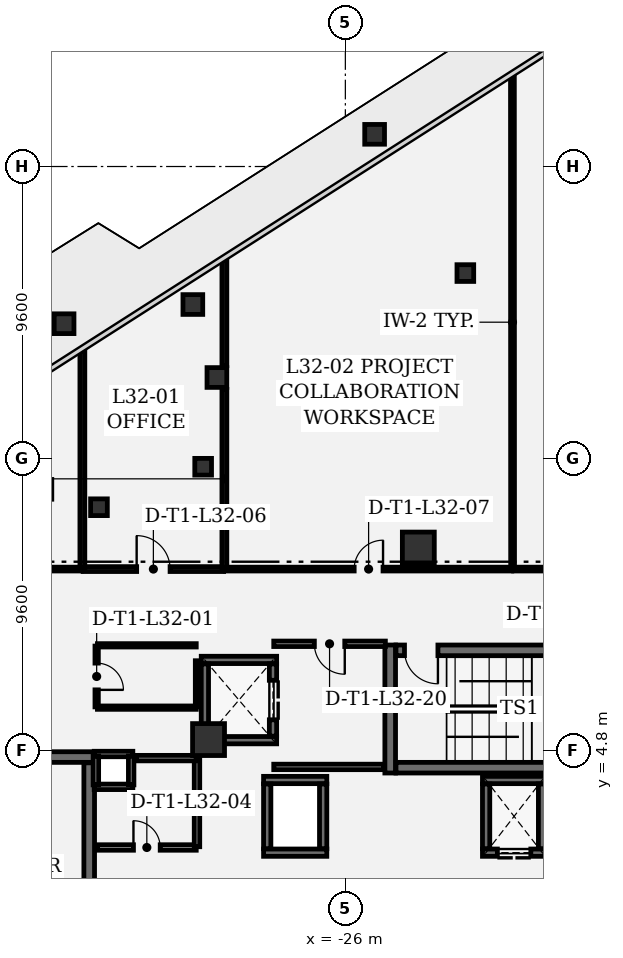
"""IFC4 building model, lengths in metres.
Left out: names, types, materials, properties, quantities, classifications, styles, units other than length and angle.
Written with IfcOpenShell. Run it as: python <this file> out.ifc"""

import sys

from ifc_helpers import new_model, si_unit, direction, frame, frame_2d, origin, origin_2d, place, context, subcontext, project, spatial, rectangle, extrude, element, fill, save


model = new_model("IFC4")
c1 = context("Model", 3, precision=1e-05, world=origin(), true_north=direction((0.0, 1.0)))
c2 = subcontext(c1, "Body", "Model", "MODEL_VIEW")
j1 = project(units=[si_unit("LENGTHUNIT", "METRE"), si_unit("PLANEANGLEUNIT", "RADIAN")], contexts=[c1])
p1 = place(None, origin())
s1 = spatial("IfcSite", under=j1, at=p1, CompositionType="ELEMENT")
p2 = place(p1, origin())
s2 = spatial("IfcBuilding", under=s1, at=p2, CompositionType="ELEMENT")
p3 = place(p2, frame((0.0, 0.0, 142.2)))
s3 = spatial("IfcBuildingStorey", under=s2, at=p3, CompositionType="ELEMENT", Elevation=142.2)
for number, where, z_axis, x_axis in (
    (1, (-23.6, 11.45, 0.0), (0.0, 0.0, 1.0), (1.0, 0.0, 0.0)),
    (2, (-30.5, 5.15, 0.0), (0.0, 0.0, 1.0), (1.0, 0.0, 0.0)),
):
    element("IfcColumn", number, at=place(p3, frame(where, z_axis=z_axis, x_axis=x_axis)), inside=s3, PredefinedType="COLUMN", context=c2, shape_type="SweptSolid", body=[
        extrude(rectangle(XDim=1.05, YDim=1.05, at=origin_2d()), origin(), (0.0, 0.0, 1.0), 4.05),
    ])
for number, where, z_axis, x_axis in (
    (3, (-35.252, 18.829, 0.0), (0.0, 0.0, 1.0), (1.0, 0.0, 0.0)),
    (4, (-25.038, 25.059, 0.0), (0.0, 0.0, 1.0), (1.0, 0.0, 0.0)),
    (5, (-31.016, 19.46, 0.0), (0.0, 0.0, 1.0), (1.0, 0.0, 0.0)),
    (6, (-30.225, 17.06, 0.0), (0.0, 0.0, 1.0), (1.0, 0.0, 0.0)),
):
    element("IfcColumn", number, at=place(p3, frame(where, z_axis=z_axis, x_axis=x_axis)), inside=s3, PredefinedType="COLUMN", context=c2, shape_type="SweptSolid", body=[
        extrude(rectangle(XDim=0.65, YDim=0.65, at=origin_2d()), origin(), (0.0, 0.0, 1.0), 4.05),
    ])
for number, where, z_axis, x_axis in (
    (7, (-34.104, 12.792, 0.0), (0.0, 0.0, 1.0), (1.0, 0.0, 0.0)),
    (8, (-22.053, 20.495, 0.0), (0.0, 0.0, 1.0), (1.0, 0.0, 0.0)),
    (9, (-30.677, 14.124, 0.0), (0.0, 0.0, 1.0), (1.0, 0.0, 0.0)),
):
    element("IfcColumn", number, at=place(p3, frame(where, z_axis=z_axis, x_axis=x_axis)), inside=s3, PredefinedType="COLUMN", context=c2, shape_type="SweptSolid", body=[
        extrude(rectangle(XDim=0.55, YDim=0.55, at=origin_2d()), origin(), (0.0, 0.0, 1.0), 4.05),
    ])
p4 = place(p3, frame((-24.525, 8.26, 0.0), z_axis=(0.0, 0.0, 1.0), x_axis=(0.0, -1.0, 0.0)))
e10 = element("IfcWall", 10, at=p4, inside=s3, PredefinedType="SHEAR", context=c2, shape_type="SweptSolid", body=[
    extrude(rectangle(XDim=4.21, YDim=0.35, at=frame_2d((2.105, 0.0))), origin(), (0.0, 0.0, 1.0), 3.78),
])
p5 = place(p3, frame((-24.335, 4.225, 0.0), z_axis=(0.0, 0.0, 1.0), x_axis=(1.0, 0.0, 0.0)))
e11 = element("IfcWall", 11, at=p5, inside=s3, PredefinedType="SHEAR", context=c2, shape_type="SweptSolid", body=[
    extrude(rectangle(XDim=8.12, YDim=0.35, at=frame_2d((4.06, 0.0))), origin(), (0.0, 0.0, 1.0), 3.78),
])
p6 = place(p3, frame((-16.215, 8.085, 0.0), z_axis=(0.0, 0.0, 1.0), x_axis=(-1.0, 0.0, 0.0)))
e12 = element("IfcWall", 12, at=p6, inside=s3, PredefinedType="SHEAR", context=c2, shape_type="SweptSolid", body=[
    extrude(rectangle(XDim=8.12, YDim=0.35, at=frame_2d((4.06, 0.0))), origin(), (0.0, 0.0, 1.0), 3.78),
])
p7 = place(p6, frame((6.74, 0.0, 0.0)))
e13 = element("IfcOpeningElement", 13, at=p7, cuts=e12, PredefinedType="OPENING", context=c2, shape_type="SweptSolid", body=[
    extrude(rectangle(XDim=1.1, YDim=2.2, at=frame_2d((0.55, 1.1))), frame((0.0, 0.185, 0.0), z_axis=(0.0, -1.0, 0.0), x_axis=(1.0, 0.0, 0.0)), (0.0, 0.0, 1.0), 0.37),
])
p8 = place(p3, frame((-34.25, 4.575, 0.0), z_axis=(0.0, 0.0, 1.0), x_axis=(-1.0, 0.0, 0.0)))
e14 = element("IfcWall", 14, at=p8, inside=s3, PredefinedType="SHEAR", context=c2, shape_type="SweptSolid", body=[
    extrude(rectangle(XDim=4.21, YDim=0.35, at=frame_2d((2.105, 0.0))), origin(), (0.0, 0.0, 1.0), 3.78),
])
p9 = place(p3, frame((-34.425, -4.385, 0.0), z_axis=(0.0, 0.0, 1.0), x_axis=(0.0, 1.0, 0.0)))
e15 = element("IfcWall", 15, at=p9, inside=s3, PredefinedType="SHEAR", context=c2, shape_type="SweptSolid", body=[
    extrude(rectangle(XDim=8.77, YDim=0.35, at=frame_2d((4.385, 0.0))), origin(), (0.0, 0.0, 1.0), 3.78),
])
for number, where, z_axis, x_axis in (
    (16, (-28.26, 5.13, 0.0), (0.0, 0.0, 1.0), (-1.0, 0.0, 0.0)),
    (17, (-30.74, 7.77, 0.0), (0.0, 0.0, 1.0), (1.0, 0.0, 0.0)),
):
    element("IfcWall", number, at=place(p3, frame(where, z_axis=z_axis, x_axis=x_axis)), inside=s3, PredefinedType="SHEAR", context=c2, shape_type="SweptSolid", body=[
        extrude(rectangle(XDim=2.48, YDim=0.24, at=frame_2d((1.24, 0.0))), origin(), (0.0, 0.0, 1.0), 3.78),
    ])
p10 = place(p3, frame((-30.62, 5.262, 0.0), z_axis=(0.0, 0.0, 1.0), x_axis=(0.0, 1.0, 0.0)))
e18 = element("IfcWall", 18, at=p10, inside=s3, PredefinedType="SHEAR", context=c2, shape_type="SweptSolid", body=[
    extrude(rectangle(XDim=2.376, YDim=0.24, at=frame_2d((1.188, 0.0))), origin(), (0.0, 0.0, 1.0), 3.78),
])
p11 = place(p3, frame((-28.38, 7.638, 0.0), z_axis=(0.0, 0.0, 1.0), x_axis=(0.0, -1.0, 0.0)))
e19 = element("IfcWall", 19, at=p11, inside=s3, PredefinedType="SHEAR", context=c2, shape_type="SweptSolid", body=[
    extrude(rectangle(XDim=2.376, YDim=0.24, at=frame_2d((1.188, 0.0))), origin(), (0.0, 0.0, 1.0), 3.78),
])
p12 = place(p11, frame((0.538, 0.0, 0.0)))
e20 = element("IfcOpeningElement", 20, at=p12, cuts=e19, PredefinedType="OPENING", context=c2, shape_type="SweptSolid", body=[
    extrude(rectangle(XDim=1.3, YDim=2.3, at=frame_2d((0.65, 1.15))), frame((0.0, 0.13, 0.0), z_axis=(0.0, -1.0, 0.0), x_axis=(1.0, 0.0, 0.0)), (0.0, 0.0, 1.0), 0.26),
])
for number, where, z_axis, x_axis in (
    (21, (-26.61, 1.43, 0.0), (0.0, 0.0, 1.0), (-1.0, 0.0, 0.0)),
    (22, (-28.69, 3.82, 0.0), (0.0, 0.0, 1.0), (1.0, 0.0, 0.0)),
):
    element("IfcWall", number, at=place(p3, frame(where, z_axis=z_axis, x_axis=x_axis)), inside=s3, PredefinedType="SHEAR", context=c2, shape_type="SweptSolid", body=[
        extrude(rectangle(XDim=2.08, YDim=0.24, at=frame_2d((1.04, 0.0))), origin(), (0.0, 0.0, 1.0), 3.78),
    ])
for number, where, z_axis, x_axis in (
    (23, (-28.57, 1.562, 0.0), (0.0, 0.0, 1.0), (0.0, 1.0, 0.0)),
    (24, (-26.73, 3.688, 0.0), (0.0, 0.0, 1.0), (0.0, -1.0, 0.0)),
):
    element("IfcWall", number, at=place(p3, frame(where, z_axis=z_axis, x_axis=x_axis)), inside=s3, PredefinedType="SHEAR", context=c2, shape_type="SweptSolid", body=[
        extrude(rectangle(XDim=2.126, YDim=0.24, at=frame_2d((1.063, 0.0))), origin(), (0.0, 0.0, 1.0), 3.78),
    ])
p13 = place(p3, frame((-19.41, 1.43, 0.0), z_axis=(0.0, 0.0, 1.0), x_axis=(-1.0, 0.0, 0.0)))
e25 = element("IfcWall", 25, at=p13, inside=s3, PredefinedType="SHEAR", context=c2, shape_type="SweptSolid", body=[
    extrude(rectangle(XDim=2.08, YDim=0.24, at=frame_2d((1.04, 0.0))), origin(), (0.0, 0.0, 1.0), 3.78),
])
p14 = place(p13, frame((0.49, 0.0, 0.0)))
e26 = element("IfcOpeningElement", 26, at=p14, cuts=e25, PredefinedType="OPENING", context=c2, shape_type="SweptSolid", body=[
    extrude(rectangle(XDim=1.1, YDim=2.2, at=frame_2d((0.55, 1.1))), frame((0.0, 0.13, 0.0), z_axis=(0.0, -1.0, 0.0), x_axis=(1.0, 0.0, 0.0)), (0.0, 0.0, 1.0), 0.26),
])
p15 = place(p3, frame((-21.49, 3.82, 0.0), z_axis=(0.0, 0.0, 1.0), x_axis=(1.0, 0.0, 0.0)))
e27 = element("IfcWall", 27, at=p15, inside=s3, PredefinedType="SHEAR", context=c2, shape_type="SweptSolid", body=[
    extrude(rectangle(XDim=2.08, YDim=0.24, at=frame_2d((1.04, 0.0))), origin(), (0.0, 0.0, 1.0), 3.78),
])
for number, where, z_axis, x_axis in (
    (28, (-21.37, 1.562, 0.0), (0.0, 0.0, 1.0), (0.0, 1.0, 0.0)),
    (29, (-19.53, 3.688, 0.0), (0.0, 0.0, 1.0), (0.0, -1.0, 0.0)),
):
    element("IfcWall", number, at=place(p3, frame(where, z_axis=z_axis, x_axis=x_axis)), inside=s3, PredefinedType="SHEAR", context=c2, shape_type="SweptSolid", body=[
        extrude(rectangle(XDim=2.126, YDim=0.24, at=frame_2d((1.063, 0.0))), origin(), (0.0, 0.0, 1.0), 3.78),
    ])
for number, where, z_axis, x_axis in (
    (30, (-32.99, 3.595, 0.0), (0.0, 0.0, 1.0), (-1.0, 0.0, 0.0)),
    (31, (-34.26, 4.675, 0.0), (0.0, 0.0, 1.0), (1.0, 0.0, 0.0)),
):
    element("IfcWall", number, at=place(p3, frame(where, z_axis=z_axis, x_axis=x_axis)), inside=s3, PredefinedType="PARTITIONING", context=c2, shape_type="SweptSolid", body=[
        extrude(rectangle(XDim=1.27, YDim=0.18, at=frame_2d((0.635, 0.0))), origin(), (0.0, 0.0, 1.0), 3.78),
    ])
for number, where, z_axis, x_axis in (
    (32, (-34.205, 3.66, 0.0), (0.0, 0.0, 1.0), (0.0, 1.0, 0.0)),
    (33, (-33.045, 4.61, 0.0), (0.0, 0.0, 1.0), (0.0, -1.0, 0.0)),
):
    element("IfcWall", number, at=place(p3, frame(where, z_axis=z_axis, x_axis=x_axis)), inside=s3, PredefinedType="PARTITIONING", context=c2, shape_type="SweptSolid", body=[
        extrude(rectangle(XDim=0.95, YDim=0.18, at=frame_2d((0.475, 0.0))), origin(), (0.0, 0.0, 1.0), 3.78),
    ])
p16 = place(p3, frame((-28.355, 4.25, 0.0), z_axis=(0.0, 0.0, 1.0), x_axis=(1.0, 0.0, 0.0)))
e34 = element("IfcWall", 34, at=p16, inside=s3, PredefinedType="PARTITIONING", context=c2, shape_type="SweptSolid", body=[
    extrude(rectangle(XDim=3.622, YDim=0.18, at=frame_2d((1.811, 0.0))), origin(), (0.0, 0.0, 1.0), 3.78),
])
p17 = place(p3, frame((-24.684, 8.3, 0.0), z_axis=(0.0, 0.0, 1.0), x_axis=(-1.0, 0.0, 0.0)))
e35 = element("IfcWall", 35, at=p17, inside=s3, PredefinedType="PARTITIONING", context=c2, shape_type="SweptSolid", body=[
    extrude(rectangle(XDim=3.671, YDim=0.18, at=frame_2d((1.835, 0.0))), origin(), (0.0, 0.0, 1.0), 3.78),
])
p18 = place(p17, frame((1.335, 0.0, 0.0)))
e36 = element("IfcOpeningElement", 36, at=p18, cuts=e35, PredefinedType="OPENING", context=c2, shape_type="SweptSolid", body=[
    extrude(rectangle(XDim=1.0, YDim=2.15, at=frame_2d((0.5, 1.075))), frame((0.0, 0.1, 0.0), z_axis=(0.0, -1.0, 0.0), x_axis=(1.0, 0.0, 0.0)), (0.0, 0.0, 1.0), 0.2),
])
p19 = place(p3, frame((-34.18, 8.225, 0.0), z_axis=(0.0, 0.0, 1.0), x_axis=(0.0, -1.0, 0.0)))
e37 = element("IfcWall", 37, at=p19, inside=s3, PredefinedType="PARTITIONING", context=c2, shape_type="SweptSolid", body=[
    extrude(rectangle(XDim=2.0, YDim=0.11, at=frame_2d((1.0, 0.0))), origin(), (0.0, 0.0, 1.0), 3.78),
])
p20 = place(p19, frame((0.56, 0.0, 0.0)))
e38 = element("IfcOpeningElement", 38, at=p20, cuts=e37, PredefinedType="OPENING", context=c2, shape_type="SweptSolid", body=[
    extrude(rectangle(XDim=0.88, YDim=2.1, at=frame_2d((0.44, 1.05))), frame((0.0, 0.065, 0.0), z_axis=(0.0, -1.0, 0.0), x_axis=(1.0, 0.0, 0.0)), (0.0, 0.0, 1.0), 0.13),
])
p21 = place(p3, frame((-34.155, 6.2, 0.0), z_axis=(0.0, 0.0, 1.0), x_axis=(1.0, 0.0, 0.0)))
e39 = element("IfcWall", 39, at=p21, inside=s3, PredefinedType="PARTITIONING", context=c2, shape_type="SweptSolid", body=[
    extrude(rectangle(XDim=3.25, YDim=0.11, at=frame_2d((1.625, 0.0))), origin(), (0.0, 0.0, 1.0), 3.344),
])
p22 = place(p3, frame((-30.88, 6.225, 0.0), z_axis=(0.0, 0.0, 1.0), x_axis=(0.0, 1.0, 0.0)))
e40 = element("IfcWall", 40, at=p22, inside=s3, PredefinedType="PARTITIONING", context=c2, shape_type="SweptSolid", body=[
    extrude(rectangle(XDim=1.518, YDim=0.11, at=frame_2d((0.759, 0.0))), origin(), (0.0, 0.0, 1.0), 3.78),
])
p23 = place(p3, frame((-30.905, 8.25, 0.0), z_axis=(0.0, 0.0, 1.0), x_axis=(-1.0, 0.0, 0.0)))
e41 = element("IfcWall", 41, at=p23, inside=s3, PredefinedType="PARTITIONING", context=c2, shape_type="SweptSolid", body=[
    extrude(rectangle(XDim=3.25, YDim=0.11, at=frame_2d((1.625, 0.0))), origin(), (0.0, 0.0, 1.0), 3.78),
])
p24 = place(p3, frame((-34.155, 1.6, 0.0), z_axis=(0.0, 0.0, 1.0), x_axis=(1.0, 0.0, 0.0)))
e42 = element("IfcWall", 42, at=p24, inside=s3, PredefinedType="PARTITIONING", context=c2, shape_type="SweptSolid", body=[
    extrude(rectangle(XDim=3.25, YDim=0.18, at=frame_2d((1.625, 0.0))), origin(), (0.0, 0.0, 1.0), 3.78),
])
p25 = place(p24, frame((1.185, 0.0, 0.0)))
e43 = element("IfcOpeningElement", 43, at=p25, cuts=e42, PredefinedType="OPENING", context=c2, shape_type="SweptSolid", body=[
    extrude(rectangle(XDim=0.88, YDim=2.1, at=frame_2d((0.44, 1.05))), frame((0.0, 0.1, 0.0), z_axis=(0.0, -1.0, 0.0), x_axis=(1.0, 0.0, 0.0)), (0.0, 0.0, 1.0), 0.2),
])
p26 = place(p3, frame((-30.88, 1.625, 0.0), z_axis=(0.0, 0.0, 1.0), x_axis=(0.0, 1.0, 0.0)))
e44 = element("IfcWall", 44, at=p26, inside=s3, PredefinedType="PARTITIONING", context=c2, shape_type="SweptSolid", body=[
    extrude(rectangle(XDim=2.89, YDim=0.18, at=frame_2d((1.445, 0.0))), origin(), (0.0, 0.0, 1.0), 3.78),
])
p27 = place(p3, frame((-30.905, 4.54, 0.0), z_axis=(0.0, 0.0, 1.0), x_axis=(-1.0, 0.0, 0.0)))
e45 = element("IfcWall", 45, at=p27, inside=s3, PredefinedType="PARTITIONING", context=c2, shape_type="SweptSolid", body=[
    extrude(rectangle(XDim=1.975, YDim=0.18, at=frame_2d((0.988, 0.0))), origin(), (0.0, 0.0, 1.0), 3.78),
])
p28 = place(p3, frame((-34.625, 10.758, 0.0), z_axis=(0.0, 0.0, 1.0), x_axis=(1.0, 0.0, 0.0)))
e46 = element("IfcWall", 46, at=p28, inside=s3, PredefinedType="PARTITIONING", context=c2, shape_type="SweptSolid", body=[
    extrude(rectangle(XDim=4.621, YDim=0.16, at=frame_2d((2.311, 0.0))), origin(), (0.0, 0.0, 1.0), 3.344),
])
p29 = place(p28, frame((1.76, 0.0, 0.0)))
e47 = element("IfcOpeningElement", 47, at=p29, cuts=e46, PredefinedType="OPENING", context=c2, shape_type="SweptSolid", body=[
    extrude(rectangle(XDim=1.1, YDim=2.15, at=frame_2d((0.55, 1.075))), frame((0.0, 0.09, 0.0), z_axis=(0.0, -1.0, 0.0), x_axis=(1.0, 0.0, 0.0)), (0.0, 0.0, 1.0), 0.18),
])
p30 = place(p3, frame((-29.979, 10.783, 0.0), z_axis=(0.0, 0.0, 1.0), x_axis=(0.0, 1.0, 0.0)))
e48 = element("IfcWall", 48, at=p30, inside=s3, PredefinedType="PARTITIONING", context=c2, shape_type="SweptSolid", body=[
    extrude(rectangle(XDim=5.886, YDim=0.16, at=frame_2d((2.943, 0.0))), origin(), (0.0, 0.0, 1.0), 3.78),
])
p31 = place(p3, frame((-29.979, 17.45, 0.0), z_axis=(0.0, 0.0, 1.0), x_axis=(0.0, 1.0, 0.0)))
e49 = element("IfcWall", 49, at=p31, inside=s3, PredefinedType="PARTITIONING", context=c2, shape_type="SweptSolid", body=[
    extrude(rectangle(XDim=3.47, YDim=0.16, at=frame_2d((1.735, 0.0))), origin(), (0.0, 0.0, 1.0), 3.78),
])
p32 = place(p3, frame((-34.65, 17.935, 0.0), z_axis=(0.0, 0.0, 1.0), x_axis=(0.0, -1.0, 0.0)))
e50 = element("IfcWall", 50, at=p32, inside=s3, PredefinedType="PARTITIONING", context=c2, shape_type="SweptSolid", body=[
    extrude(rectangle(XDim=7.151, YDim=0.16, at=frame_2d((3.576, 0.0))), origin(), (0.0, 0.0, 1.0), 3.78),
])
p33 = place(p3, frame((-29.946, 10.758, 0.0), z_axis=(0.0, 0.0, 1.0), x_axis=(1.0, 0.0, 0.0)))
e51 = element("IfcWall", 51, at=p33, inside=s3, PredefinedType="PARTITIONING", context=c2, shape_type="SweptSolid", body=[
    extrude(rectangle(XDim=9.421, YDim=0.125, at=frame_2d((4.711, 0.0))), origin(), (0.0, 0.0, 1.0), 3.78),
])
p34 = place(p33, frame((4.236, 0.0, 0.0)))
e52 = element("IfcOpeningElement", 52, at=p34, cuts=e51, PredefinedType="OPENING", context=c2, shape_type="SweptSolid", body=[
    extrude(rectangle(XDim=0.95, YDim=2.15, at=frame_2d((0.475, 1.075))), frame((0.0, 0.073, 0.0), z_axis=(0.0, -1.0, 0.0), x_axis=(1.0, 0.0, 0.0)), (0.0, 0.0, 1.0), 0.145),
])
p35 = place(p3, frame((-20.499, 10.783, 0.0), z_axis=(0.0, 0.0, 1.0), x_axis=(-0.000346792899, 0.999999939867, 0.0)))
e53 = element("IfcWall", 53, at=p35, inside=s3, PredefinedType="PARTITIONING", context=c2, shape_type="SweptSolid", body=[
    extrude(rectangle(XDim=16.192, YDim=0.125, at=frame_2d((8.096, 0.0))), origin(), (0.0, 0.0, 1.0), 2.895),
])
p36 = place(p3, frame((-20.466, 10.758, 0.0), z_axis=(0.0, 0.0, 1.0), x_axis=(1.0, 0.0, 0.0)))
e54 = element("IfcWall", 54, at=p36, inside=s3, PredefinedType="PARTITIONING", context=c2, shape_type="SweptSolid", body=[
    extrude(rectangle(XDim=3.523, YDim=0.125, at=frame_2d((1.761, 0.0))), origin(), (0.0, 0.0, 1.0), 3.78),
])
p37 = place(p36, frame((1.286, 0.0, 0.0)))
e55 = element("IfcOpeningElement", 55, at=p37, cuts=e54, PredefinedType="OPENING", context=c2, shape_type="SweptSolid", body=[
    extrude(rectangle(XDim=0.95, YDim=2.15, at=frame_2d((0.475, 1.075))), frame((0.0, 0.073, 0.0), z_axis=(0.0, -1.0, 0.0), x_axis=(1.0, 0.0, 0.0)), (0.0, 0.0, 1.0), 0.145),
])
p38 = place(p3, frame((-37.833, 10.758, 0.0), z_axis=(0.0, 0.0, 1.0), x_axis=(1.0, 0.0, 0.0)))
e56 = element("IfcWall", 56, at=p38, inside=s3, PredefinedType="PARTITIONING", context=c2, shape_type="SweptSolid", body=[
    extrude(rectangle(XDim=3.15, YDim=0.125, at=frame_2d((1.575, 0.0))), origin(), (0.0, 0.0, 1.0), 3.344),
])
p39 = place(p7, origin())
e57 = element("IfcDoor", 57, at=p39, inside=s3, OperationType="SINGLE_SWING_LEFT", PredefinedType="DOOR", context=c2, shape_type="SweptSolid", body=[
    extrude(rectangle(XDim=1.1, YDim=2.2, at=frame_2d((0.55, 1.1))), frame((0.0, 0.025, 0.0), z_axis=(0.0, -1.0, 0.0), x_axis=(1.0, 0.0, 0.0)), (0.0, 0.0, 1.0), 0.05),
])
fill(e13, e57)
p40 = place(p12, origin())
e58 = element("IfcDoor", 58, at=p40, inside=s3, OperationType="DOUBLE_DOOR_SLIDING", PredefinedType="DOOR", context=c2, shape_type="SweptSolid", body=[
    extrude(rectangle(XDim=1.3, YDim=2.3, at=frame_2d((0.65, 1.15))), frame((0.0, 0.025, 0.0), z_axis=(0.0, -1.0, 0.0), x_axis=(1.0, 0.0, 0.0)), (0.0, 0.0, 1.0), 0.05),
])
fill(e20, e58)
p41 = place(p14, origin())
e59 = element("IfcDoor", 59, at=p41, inside=s3, OperationType="DOUBLE_DOOR_SLIDING", PredefinedType="DOOR", context=c2, shape_type="SweptSolid", body=[
    extrude(rectangle(XDim=1.1, YDim=2.2, at=frame_2d((0.55, 1.1))), frame((0.0, 0.025, 0.0), z_axis=(0.0, -1.0, 0.0), x_axis=(1.0, 0.0, 0.0)), (0.0, 0.0, 1.0), 0.05),
])
fill(e26, e59)
p42 = place(p20, origin())
e60 = element("IfcDoor", 60, at=p42, inside=s3, OperationType="SINGLE_SWING_RIGHT", PredefinedType="DOOR", context=c2, shape_type="SweptSolid", body=[
    extrude(rectangle(XDim=0.88, YDim=2.1, at=frame_2d((0.44, 1.05))), frame((0.0, 0.025, 0.0), z_axis=(0.0, -1.0, 0.0), x_axis=(1.0, 0.0, 0.0)), (0.0, 0.0, 1.0), 0.05),
])
fill(e38, e60)
p43 = place(p25, origin())
e61 = element("IfcDoor", 61, at=p43, inside=s3, OperationType="SINGLE_SWING_LEFT", PredefinedType="DOOR", context=c2, shape_type="SweptSolid", body=[
    extrude(rectangle(XDim=0.88, YDim=2.1, at=frame_2d((0.44, 1.05))), frame((0.0, 0.025, 0.0), z_axis=(0.0, -1.0, 0.0), x_axis=(1.0, 0.0, 0.0)), (0.0, 0.0, 1.0), 0.05),
])
fill(e43, e61)
p44 = place(p29, origin())
e62 = element("IfcDoor", 62, at=p44, inside=s3, OperationType="SINGLE_SWING_LEFT", PredefinedType="DOOR", context=c2, shape_type="SweptSolid", body=[
    extrude(rectangle(XDim=1.1, YDim=2.15, at=frame_2d((0.55, 1.075))), frame((0.0, 0.025, 0.0), z_axis=(0.0, -1.0, 0.0), x_axis=(1.0, 0.0, 0.0)), (0.0, 0.0, 1.0), 0.05),
])
fill(e47, e62)
p45 = place(p34, origin())
e63 = element("IfcDoor", 63, at=p45, inside=s3, OperationType="SINGLE_SWING_RIGHT", PredefinedType="DOOR", context=c2, shape_type="SweptSolid", body=[
    extrude(rectangle(XDim=0.95, YDim=2.15, at=frame_2d((0.475, 1.075))), frame((0.0, 0.025, 0.0), z_axis=(0.0, -1.0, 0.0), x_axis=(1.0, 0.0, 0.0)), (0.0, 0.0, 1.0), 0.05),
])
fill(e52, e63)
p46 = place(p18, origin())
e64 = element("IfcDoor", 64, at=p46, inside=s3, OperationType="SINGLE_SWING_LEFT", PredefinedType="DOOR", context=c2, shape_type="SweptSolid", body=[
    extrude(rectangle(XDim=1.0, YDim=2.15, at=frame_2d((0.5, 1.075))), frame((0.0, 0.025, 0.0), z_axis=(0.0, -1.0, 0.0), x_axis=(1.0, 0.0, 0.0)), (0.0, 0.0, 1.0), 0.05),
])
fill(e36, e64)
save(model, sys.argv[1])
